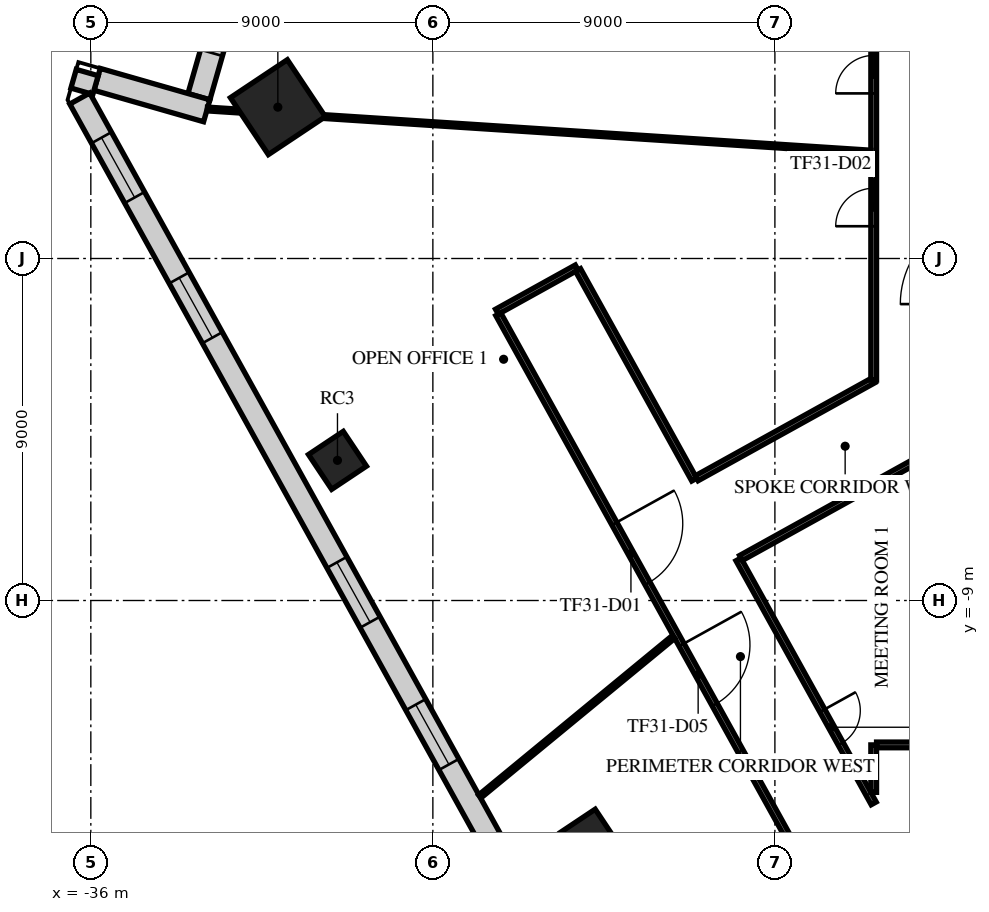
"""IFC4 building model, lengths in metres.
Left out: names, types, materials, properties, quantities, classifications, styles, units other than length and angle.
Written with IfcOpenShell. Run it as: python <this file> out.ifc"""

import sys

from ifc_helpers import new_model, si_unit, direction, frame, frame_2d, origin, origin_2d, place, context, subcontext, project, spatial, rectangle, extrude, element, fill, save


model = new_model("IFC4")
c1 = context("Model", 3, precision=1e-05, world=origin(), true_north=direction((0.0, 1.0)))
c2 = subcontext(c1, "Body", "Model", "MODEL_VIEW")
j1 = project(units=[si_unit("LENGTHUNIT", "METRE"), si_unit("PLANEANGLEUNIT", "RADIAN")], contexts=[c1])
p1 = place(None, origin())
s1 = spatial("IfcSite", under=j1, at=p1, CompositionType="ELEMENT")
p2 = place(p1, origin())
s2 = spatial("IfcBuilding", under=s1, at=p2, CompositionType="ELEMENT")
p3 = place(p2, frame((0.0, 0.0, 135.7)))
s3 = spatial("IfcBuildingStorey", under=s2, at=p3, CompositionType="ELEMENT", Elevation=135.7)
p4 = place(p3, frame((-31.079, 3.982, -0.4), z_axis=(0.0, 0.0, 1.0), x_axis=(0.832028680356, 0.55473261583, 0.0)))
e1 = element("IfcColumn", 1, at=p4, inside=s3, PredefinedType="COLUMN", context=c2, shape_type="SweptSolid", body=[
    extrude(rectangle(XDim=1.8, YDim=1.8, at=origin_2d()), origin(), (0.0, 0.0, 1.0), 4.4),
])
for number, where, z_axis, x_axis in (
    (2, (-29.51, -5.312, -0.4), (0.0, 0.0, 1.0), (0.832, 0.555, 0.0)),
    (3, (-22.881, -15.255, -0.4), (0.0, 0.0, 1.0), (0.832, 0.555, 0.0)),
):
    element("IfcColumn", number, at=place(p3, frame(where, z_axis=z_axis, x_axis=x_axis)), inside=s3, PredefinedType="COLUMN", context=c2, shape_type="SweptSolid", body=[
        extrude(rectangle(XDim=1.1, YDim=1.1, at=origin_2d()), origin(), (0.0, 0.0, 1.0), 4.4),
    ])
p5 = place(p3, frame((-31.778, 9.065, 0.0), z_axis=(0.0, 0.0, 1.0), x_axis=(-0.275675415896, -0.961250781571, 0.0)))
e4 = element("IfcWall", 4, at=p5, inside=s3, PredefinedType="STANDARD", context=c2, shape_type="SweptSolid", body=[
    extrude(rectangle(XDim=5.0, YDim=0.6, at=frame_2d((2.5, 0.0))), origin(), (0.0, 0.0, 1.0), 3.6),
])
p6 = place(p5, frame((1.2, 0.0, 0.9)))
e5 = element("IfcOpeningElement", 5, at=p6, cuts=e4, PredefinedType="OPENING", context=c2, shape_type="SweptSolid", body=[
    extrude(rectangle(XDim=2.6, YDim=2.1, at=frame_2d((1.3, 1.05))), frame((0.0, 0.31, 0.0), z_axis=(0.0, -1.0, 0.0), x_axis=(1.0, 0.0, 0.0)), (0.0, 0.0, 1.0), 0.62),
])
p7 = place(p3, frame((-32.95, 3.887, 0.0), z_axis=(0.0, 0.0, 1.0), x_axis=(-0.96126248289, 0.275634611374, 0.0)))
e6 = element("IfcWall", 6, at=p7, inside=s3, PredefinedType="STANDARD", context=c2, shape_type="SweptSolid", body=[
    extrude(rectangle(XDim=3.0, YDim=0.6, at=frame_2d((1.5, 0.0))), origin(), (0.0, 0.0, 1.0), 3.6),
])
p8 = place(p3, frame((-36.095, 4.893, 0.0), z_axis=(0.0, 0.0, 1.0), x_axis=(-0.275982153595, -0.961162759837, 0.0)))
e7 = element("IfcWall", 7, at=p8, inside=s3, PredefinedType="STANDARD", context=c2, shape_type="SweptSolid", body=[
    extrude(rectangle(XDim=0.511, YDim=0.6, at=frame_2d((0.256, 0.0))), origin(), (0.0, 0.0, 1.0), 3.6),
])
p9 = place(p3, frame((-36.291, 4.209, 0.0), z_axis=(0.0, 0.0, 1.0), x_axis=(0.484810659622, -0.874619131003, 0.0)))
e8 = element("IfcWall", 8, at=p9, inside=s3, PredefinedType="STANDARD", context=c2, shape_type="SweptSolid", body=[
    extrude(rectangle(XDim=42.552, YDim=0.6, at=frame_2d((21.276, 0.0))), origin(), (0.0, 0.0, 1.0), 3.6),
])
p10 = place(p9, frame((1.178, 0.0, 0.9)))
e9 = element("IfcOpeningElement", 9, at=p10, cuts=e8, PredefinedType="OPENING", context=c2, shape_type="SweptSolid", body=[
    extrude(rectangle(XDim=1.8, YDim=2.1, at=frame_2d((0.9, 1.05))), frame((0.0, 0.31, 0.0), z_axis=(0.0, -1.0, 0.0), x_axis=(1.0, 0.0, 0.0)), (0.0, 0.0, 1.0), 0.62),
])
p11 = place(p9, frame((5.396, 0.0, 0.9)))
e10 = element("IfcOpeningElement", 10, at=p11, cuts=e8, PredefinedType="OPENING", context=c2, shape_type="SweptSolid", body=[
    extrude(rectangle(XDim=1.8, YDim=2.1, at=frame_2d((0.9, 1.05))), frame((0.0, 0.31, 0.0), z_axis=(0.0, -1.0, 0.0), x_axis=(1.0, 0.0, 0.0)), (0.0, 0.0, 1.0), 0.62),
])
p12 = place(p9, frame((13.956, 0.0, 0.9)))
e11 = element("IfcOpeningElement", 11, at=p12, cuts=e8, PredefinedType="OPENING", context=c2, shape_type="SweptSolid", body=[
    extrude(rectangle(XDim=1.8, YDim=2.1, at=frame_2d((0.9, 1.05))), frame((0.0, 0.31, 0.0), z_axis=(0.0, -1.0, 0.0), x_axis=(1.0, 0.0, 0.0)), (0.0, 0.0, 1.0), 0.62),
])
p13 = place(p9, frame((18.236, 0.0, 0.9)))
e12 = element("IfcOpeningElement", 12, at=p13, cuts=e8, PredefinedType="OPENING", context=c2, shape_type="SweptSolid", body=[
    extrude(rectangle(XDim=1.8, YDim=2.1, at=frame_2d((0.9, 1.05))), frame((0.0, 0.31, 0.0), z_axis=(0.0, -1.0, 0.0), x_axis=(1.0, 0.0, 0.0)), (0.0, 0.0, 1.0), 0.62),
])
p14 = place(p9, frame((22.516, 0.0, 0.9)))
e13 = element("IfcOpeningElement", 13, at=p14, cuts=e8, PredefinedType="OPENING", context=c2, shape_type="SweptSolid", body=[
    extrude(rectangle(XDim=1.8, YDim=2.1, at=frame_2d((0.9, 1.05))), frame((0.0, 0.31, 0.0), z_axis=(0.0, -1.0, 0.0), x_axis=(1.0, 0.0, 0.0)), (0.0, 0.0, 1.0), 0.62),
])
p15 = place(p9, frame((26.796, 0.0, 0.9)))
e14 = element("IfcOpeningElement", 14, at=p15, cuts=e8, PredefinedType="OPENING", context=c2, shape_type="SweptSolid", body=[
    extrude(rectangle(XDim=1.8, YDim=2.1, at=frame_2d((0.9, 1.05))), frame((0.0, 0.31, 0.0), z_axis=(0.0, -1.0, 0.0), x_axis=(1.0, 0.0, 0.0)), (0.0, 0.0, 1.0), 0.62),
])
p16 = place(p9, frame((31.076, 0.0, 0.9)))
e15 = element("IfcOpeningElement", 15, at=p16, cuts=e8, PredefinedType="OPENING", context=c2, shape_type="SweptSolid", body=[
    extrude(rectangle(XDim=1.8, YDim=2.1, at=frame_2d((0.9, 1.05))), frame((0.0, 0.31, 0.0), z_axis=(0.0, -1.0, 0.0), x_axis=(1.0, 0.0, 0.0)), (0.0, 0.0, 1.0), 0.62),
])
p17 = place(p9, frame((35.356, 0.0, 0.9)))
e16 = element("IfcOpeningElement", 16, at=p17, cuts=e8, PredefinedType="OPENING", context=c2, shape_type="SweptSolid", body=[
    extrude(rectangle(XDim=1.8, YDim=2.1, at=frame_2d((0.9, 1.05))), frame((0.0, 0.31, 0.0), z_axis=(0.0, -1.0, 0.0), x_axis=(1.0, 0.0, 0.0)), (0.0, 0.0, 1.0), 0.62),
])
p18 = place(p9, frame((39.573, 0.0, 0.9)))
e17 = element("IfcOpeningElement", 17, at=p18, cuts=e8, PredefinedType="OPENING", context=c2, shape_type="SweptSolid", body=[
    extrude(rectangle(XDim=1.8, YDim=2.1, at=frame_2d((0.9, 1.05))), frame((0.0, 0.31, 0.0), z_axis=(0.0, -1.0, 0.0), x_axis=(1.0, 0.0, 0.0)), (0.0, 0.0, 1.0), 0.62),
])
p19 = place(p3, frame((-25.315, -1.401, 0.0), z_axis=(0.0, 0.0, 1.0), x_axis=(0.874550463112, 0.484934518745, 0.0)))
e18 = element("IfcWall", 18, at=p19, inside=s3, PredefinedType="PARTITIONING", context=c2, shape_type="SweptSolid", body=[
    extrude(rectangle(XDim=2.4, YDim=0.15, at=frame_2d((1.2, 0.0))), origin(), (0.0, 0.0, 1.0), 3.15),
])
p20 = place(p3, frame((-25.279, -1.467, 0.0), z_axis=(0.0, 0.0, 1.0), x_axis=(0.484803020703, -0.874623365294, 0.0)))
e19 = element("IfcWall", 19, at=p20, inside=s3, PredefinedType="PARTITIONING", context=c2, shape_type="SweptSolid", body=[
    extrude(rectangle(XDim=22.02, YDim=0.15, at=frame_2d((11.01, 0.0))), origin(), (0.0, 0.0, 1.0), 3.15),
])
p21 = place(p20, frame((6.3, 0.0, 0.0)))
e20 = element("IfcOpeningElement", 20, at=p21, cuts=e19, PredefinedType="OPENING", context=c2, shape_type="SweptSolid", body=[
    extrude(rectangle(XDim=1.8, YDim=2.1, at=frame_2d((0.9, 1.05))), frame((0.0, 0.085, 0.0), z_axis=(0.0, -1.0, 0.0), x_axis=(1.0, 0.0, 0.0)), (0.0, 0.0, 1.0), 0.17),
])
p22 = place(p20, frame((9.948, 0.0, 0.0)))
e21 = element("IfcOpeningElement", 21, at=p22, cuts=e19, PredefinedType="OPENING", context=c2, shape_type="SweptSolid", body=[
    extrude(rectangle(XDim=1.8, YDim=2.1, at=frame_2d((0.9, 1.05))), frame((0.0, 0.085, 0.0), z_axis=(0.0, -1.0, 0.0), x_axis=(1.0, 0.0, 0.0)), (0.0, 0.0, 1.0), 0.17),
])
p23 = place(p20, frame((20.448, 0.0, 0.0)))
e22 = element("IfcOpeningElement", 22, at=p23, cuts=e19, PredefinedType="OPENING", context=c2, shape_type="SweptSolid", body=[
    extrude(rectangle(XDim=1.0, YDim=2.1, at=frame_2d((0.5, 1.05))), frame((0.0, 0.085, 0.0), z_axis=(0.0, -1.0, 0.0), x_axis=(1.0, 0.0, 0.0)), (0.0, 0.0, 1.0), 0.17),
])
p24 = place(p3, frame((-23.18, -0.302, 0.0), z_axis=(0.0, 0.0, 1.0), x_axis=(0.48477505554, -0.874638865776, 0.0)))
e23 = element("IfcWall", 23, at=p24, inside=s3, PredefinedType="PARTITIONING", context=c2, shape_type="SweptSolid", body=[
    extrude(rectangle(XDim=6.307, YDim=0.15, at=frame_2d((3.154, 0.0))), origin(), (0.0, 0.0, 1.0), 3.15),
])
p25 = place(p3, frame((-20.056, -5.783, 0.0), z_axis=(0.0, 0.0, 1.0), x_axis=(0.874645694613, 0.484762734638, 0.0)))
e24 = element("IfcWall", 24, at=p25, inside=s3, PredefinedType="PARTITIONING", context=c2, shape_type="SweptSolid", body=[
    extrude(rectangle(XDim=5.324, YDim=0.15, at=frame_2d((2.662, 0.0))), origin(), (0.0, 0.0, 1.0), 3.15),
])
p26 = place(p3, frame((-18.959, -7.918, 0.0), z_axis=(0.0, 0.0, 1.0), x_axis=(0.484857684507, -0.874593062958, 0.0)))
e25 = element("IfcWall", 25, at=p26, inside=s3, PredefinedType="PARTITIONING", context=c2, shape_type="SweptSolid", body=[
    extrude(rectangle(XDim=7.341, YDim=0.15, at=frame_2d((3.67, 0.0))), origin(), (0.0, 0.0, 1.0), 3.15),
])
p27 = place(p26, frame((4.55, 0.0, 0.0)))
e26 = element("IfcOpeningElement", 26, at=p27, cuts=e25, PredefinedType="OPENING", context=c2, shape_type="SweptSolid", body=[
    extrude(rectangle(XDim=1.0, YDim=2.1, at=frame_2d((0.5, 1.05))), frame((0.0, 0.085, 0.0), z_axis=(0.0, -1.0, 0.0), x_axis=(1.0, 0.0, 0.0)), (0.0, 0.0, 1.0), 0.17),
])
p28 = place(p3, frame((-18.893, -7.882, 0.0), z_axis=(0.0, 0.0, 1.0), x_axis=(0.874670900287, 0.484717253861, 0.0)))
e27 = element("IfcWall", 27, at=p28, inside=s3, PredefinedType="PARTITIONING", context=c2, shape_type="SweptSolid", body=[
    extrude(rectangle(XDim=6.966, YDim=0.15, at=frame_2d((3.483, 0.0))), origin(), (0.0, 0.0, 1.0), 3.15),
])
p29 = place(p3, frame((-15.4, -14.048, 0.0), z_axis=(0.0, 0.0, 1.0), x_axis=(0.0, 1.0, 0.0)))
e28 = element("IfcWall", 28, at=p29, inside=s3, PredefinedType="PARTITIONING", context=c2, shape_type="SweptSolid", body=[
    extrude(rectangle(XDim=1.248, YDim=0.15, at=frame_2d((0.624, 0.0))), origin(), (0.0, 0.0, 1.0), 3.15),
])
p30 = place(p3, frame((-15.4, -3.201, 0.0), z_axis=(0.0, 0.0, 1.0), x_axis=(0.0, 1.0, 0.0)))
e29 = element("IfcWall", 29, at=p30, inside=s3, PredefinedType="PARTITIONING", context=c2, shape_type="SweptSolid", body=[
    extrude(rectangle(XDim=13.896, YDim=0.15, at=frame_2d((6.948, 0.0))), origin(), (0.0, 0.0, 1.0), 3.15),
])
p31 = place(p30, frame((4.05, 0.0, 0.0)))
e30 = element("IfcOpeningElement", 30, at=p31, cuts=e29, PredefinedType="OPENING", context=c2, shape_type="SweptSolid", body=[
    extrude(rectangle(XDim=1.0, YDim=2.1, at=frame_2d((0.5, 1.05))), frame((0.0, 0.085, 0.0), z_axis=(0.0, -1.0, 0.0), x_axis=(1.0, 0.0, 0.0)), (0.0, 0.0, 1.0), 0.17),
])
p32 = place(p30, frame((7.546, 0.0, 0.0)))
e31 = element("IfcOpeningElement", 31, at=p32, cuts=e29, PredefinedType="OPENING", context=c2, shape_type="SweptSolid", body=[
    extrude(rectangle(XDim=1.0, YDim=2.1, at=frame_2d((0.5, 1.05))), frame((0.0, 0.085, 0.0), z_axis=(0.0, -1.0, 0.0), x_axis=(1.0, 0.0, 0.0)), (0.0, 0.0, 1.0), 0.17),
])
p33 = place(p3, frame((-15.325, -12.8, 0.0), z_axis=(0.0, 0.0, 1.0), x_axis=(1.0, 0.0, 0.0)))
e32 = element("IfcWall", 32, at=p33, inside=s3, PredefinedType="PARTITIONING", context=c2, shape_type="SweptSolid", body=[
    extrude(rectangle(XDim=2.525, YDim=0.15, at=frame_2d((1.262, 0.0))), origin(), (0.0, 0.0, 1.0), 3.03),
])
p34 = place(p3, frame((-32.935, 3.934, 0.0), z_axis=(0.0, 0.0, 1.0), x_axis=(0.997900062075, -0.064772417822, 0.0)))
e33 = element("IfcWall", 33, at=p34, inside=s3, PredefinedType="PARTITIONING", context=c2, shape_type="SweptSolid", body=[
    extrude(rectangle(XDim=0.844, YDim=0.1, at=frame_2d((0.422, 0.0))), origin(), (0.0, 0.0, 1.0), 3.6),
])
p35 = place(p3, frame((-29.831, 3.732, 0.0), z_axis=(0.0, 0.0, 1.0), x_axis=(0.997896608912, -0.0648255962, 0.0)))
e34 = element("IfcWall", 34, at=p35, inside=s3, PredefinedType="PARTITIONING", context=c2, shape_type="SweptSolid", body=[
    extrude(rectangle(XDim=14.383, YDim=0.1, at=frame_2d((7.191, 0.0))), origin(), (0.0, 0.0, 1.0), 3.03),
])
p36 = place(p3, frame((-25.765, -14.157, 0.0), z_axis=(0.0, 0.0, 1.0), x_axis=(0.772001730939, 0.635620427164, 0.0)))
e35 = element("IfcWall", 35, at=p36, inside=s3, PredefinedType="PARTITIONING", context=c2, shape_type="SweptSolid", body=[
    extrude(rectangle(XDim=6.604, YDim=0.1, at=frame_2d((3.302, 0.0))), origin(), (0.0, 0.0, 1.0), 3.15),
])
p37 = place(p6, origin())
e36 = element("IfcWindow", 36, at=p37, inside=s3, PartitioningType="SINGLE_PANEL", PredefinedType="WINDOW", context=c2, shape_type="SweptSolid", body=[
    extrude(rectangle(XDim=2.6, YDim=2.1, at=frame_2d((1.3, 1.05))), frame((0.0, 0.03, 0.0), z_axis=(0.0, -1.0, 0.0), x_axis=(1.0, 0.0, 0.0)), (0.0, 0.0, 1.0), 0.06),
])
fill(e5, e36)
p38 = place(p10, origin())
e37 = element("IfcWindow", 37, at=p38, inside=s3, PartitioningType="SINGLE_PANEL", PredefinedType="WINDOW", context=c2, shape_type="SweptSolid", body=[
    extrude(rectangle(XDim=1.8, YDim=2.1, at=frame_2d((0.9, 1.05))), frame((0.0, 0.03, 0.0), z_axis=(0.0, -1.0, 0.0), x_axis=(1.0, 0.0, 0.0)), (0.0, 0.0, 1.0), 0.06),
])
fill(e9, e37)
p39 = place(p11, origin())
e38 = element("IfcWindow", 38, at=p39, inside=s3, PartitioningType="SINGLE_PANEL", PredefinedType="WINDOW", context=c2, shape_type="SweptSolid", body=[
    extrude(rectangle(XDim=1.8, YDim=2.1, at=frame_2d((0.9, 1.05))), frame((0.0, 0.03, 0.0), z_axis=(0.0, -1.0, 0.0), x_axis=(1.0, 0.0, 0.0)), (0.0, 0.0, 1.0), 0.06),
])
fill(e10, e38)
p40 = place(p12, origin())
e39 = element("IfcWindow", 39, at=p40, inside=s3, PartitioningType="SINGLE_PANEL", PredefinedType="WINDOW", context=c2, shape_type="SweptSolid", body=[
    extrude(rectangle(XDim=1.8, YDim=2.1, at=frame_2d((0.9, 1.05))), frame((0.0, 0.03, 0.0), z_axis=(0.0, -1.0, 0.0), x_axis=(1.0, 0.0, 0.0)), (0.0, 0.0, 1.0), 0.06),
])
fill(e11, e39)
p41 = place(p13, origin())
e40 = element("IfcWindow", 40, at=p41, inside=s3, PartitioningType="SINGLE_PANEL", PredefinedType="WINDOW", context=c2, shape_type="SweptSolid", body=[
    extrude(rectangle(XDim=1.8, YDim=2.1, at=frame_2d((0.9, 1.05))), frame((0.0, 0.03, 0.0), z_axis=(0.0, -1.0, 0.0), x_axis=(1.0, 0.0, 0.0)), (0.0, 0.0, 1.0), 0.06),
])
fill(e12, e40)
p42 = place(p21, frame((1.8, 0.0, 0.0), z_axis=(0.0, 0.0, 1.0), x_axis=(-1.0, 0.0, 0.0)))
e41 = element("IfcDoor", 41, at=p42, inside=s3, OperationType="DOUBLE_DOOR_SINGLE_SWING", PredefinedType="DOOR", context=c2, shape_type="SweptSolid", body=[
    extrude(rectangle(XDim=1.8, YDim=2.1, at=frame_2d((0.9, 1.05))), frame((0.0, 0.025, 0.0), z_axis=(0.0, -1.0, 0.0), x_axis=(1.0, 0.0, 0.0)), (0.0, 0.0, 1.0), 0.05),
])
fill(e20, e41)
p43 = place(p31, origin())
e42 = element("IfcDoor", 42, at=p43, inside=s3, OperationType="SINGLE_SWING_RIGHT", PredefinedType="DOOR", context=c2, shape_type="SweptSolid", body=[
    extrude(rectangle(XDim=1.0, YDim=2.1, at=frame_2d((0.5, 1.05))), frame((0.0, 0.025, 0.0), z_axis=(0.0, -1.0, 0.0), x_axis=(1.0, 0.0, 0.0)), (0.0, 0.0, 1.0), 0.05),
])
fill(e30, e42)
p44 = place(p32, origin())
e43 = element("IfcDoor", 43, at=p44, inside=s3, OperationType="SINGLE_SWING_RIGHT", PredefinedType="DOOR", context=c2, shape_type="SweptSolid", body=[
    extrude(rectangle(XDim=1.0, YDim=2.1, at=frame_2d((0.5, 1.05))), frame((0.0, 0.025, 0.0), z_axis=(0.0, -1.0, 0.0), x_axis=(1.0, 0.0, 0.0)), (0.0, 0.0, 1.0), 0.05),
])
fill(e31, e43)
p45 = place(p22, frame((1.8, 0.0, 0.0), z_axis=(0.0, 0.0, 1.0), x_axis=(-1.0, 0.0, 0.0)))
e44 = element("IfcDoor", 44, at=p45, inside=s3, OperationType="DOUBLE_DOOR_SINGLE_SWING", PredefinedType="DOOR", context=c2, shape_type="SweptSolid", body=[
    extrude(rectangle(XDim=1.8, YDim=2.1, at=frame_2d((0.9, 1.05))), frame((0.0, 0.025, 0.0), z_axis=(0.0, -1.0, 0.0), x_axis=(1.0, 0.0, 0.0)), (0.0, 0.0, 1.0), 0.05),
])
fill(e21, e44)
p46 = place(p27, origin())
e45 = element("IfcDoor", 45, at=p46, inside=s3, OperationType="SINGLE_SWING_LEFT", PredefinedType="DOOR", context=c2, shape_type="SweptSolid", body=[
    extrude(rectangle(XDim=1.0, YDim=2.1, at=frame_2d((0.5, 1.05))), frame((0.0, 0.025, 0.0), z_axis=(0.0, -1.0, 0.0), x_axis=(1.0, 0.0, 0.0)), (0.0, 0.0, 1.0), 0.05),
])
fill(e26, e45)
save(model, sys.argv[1])
